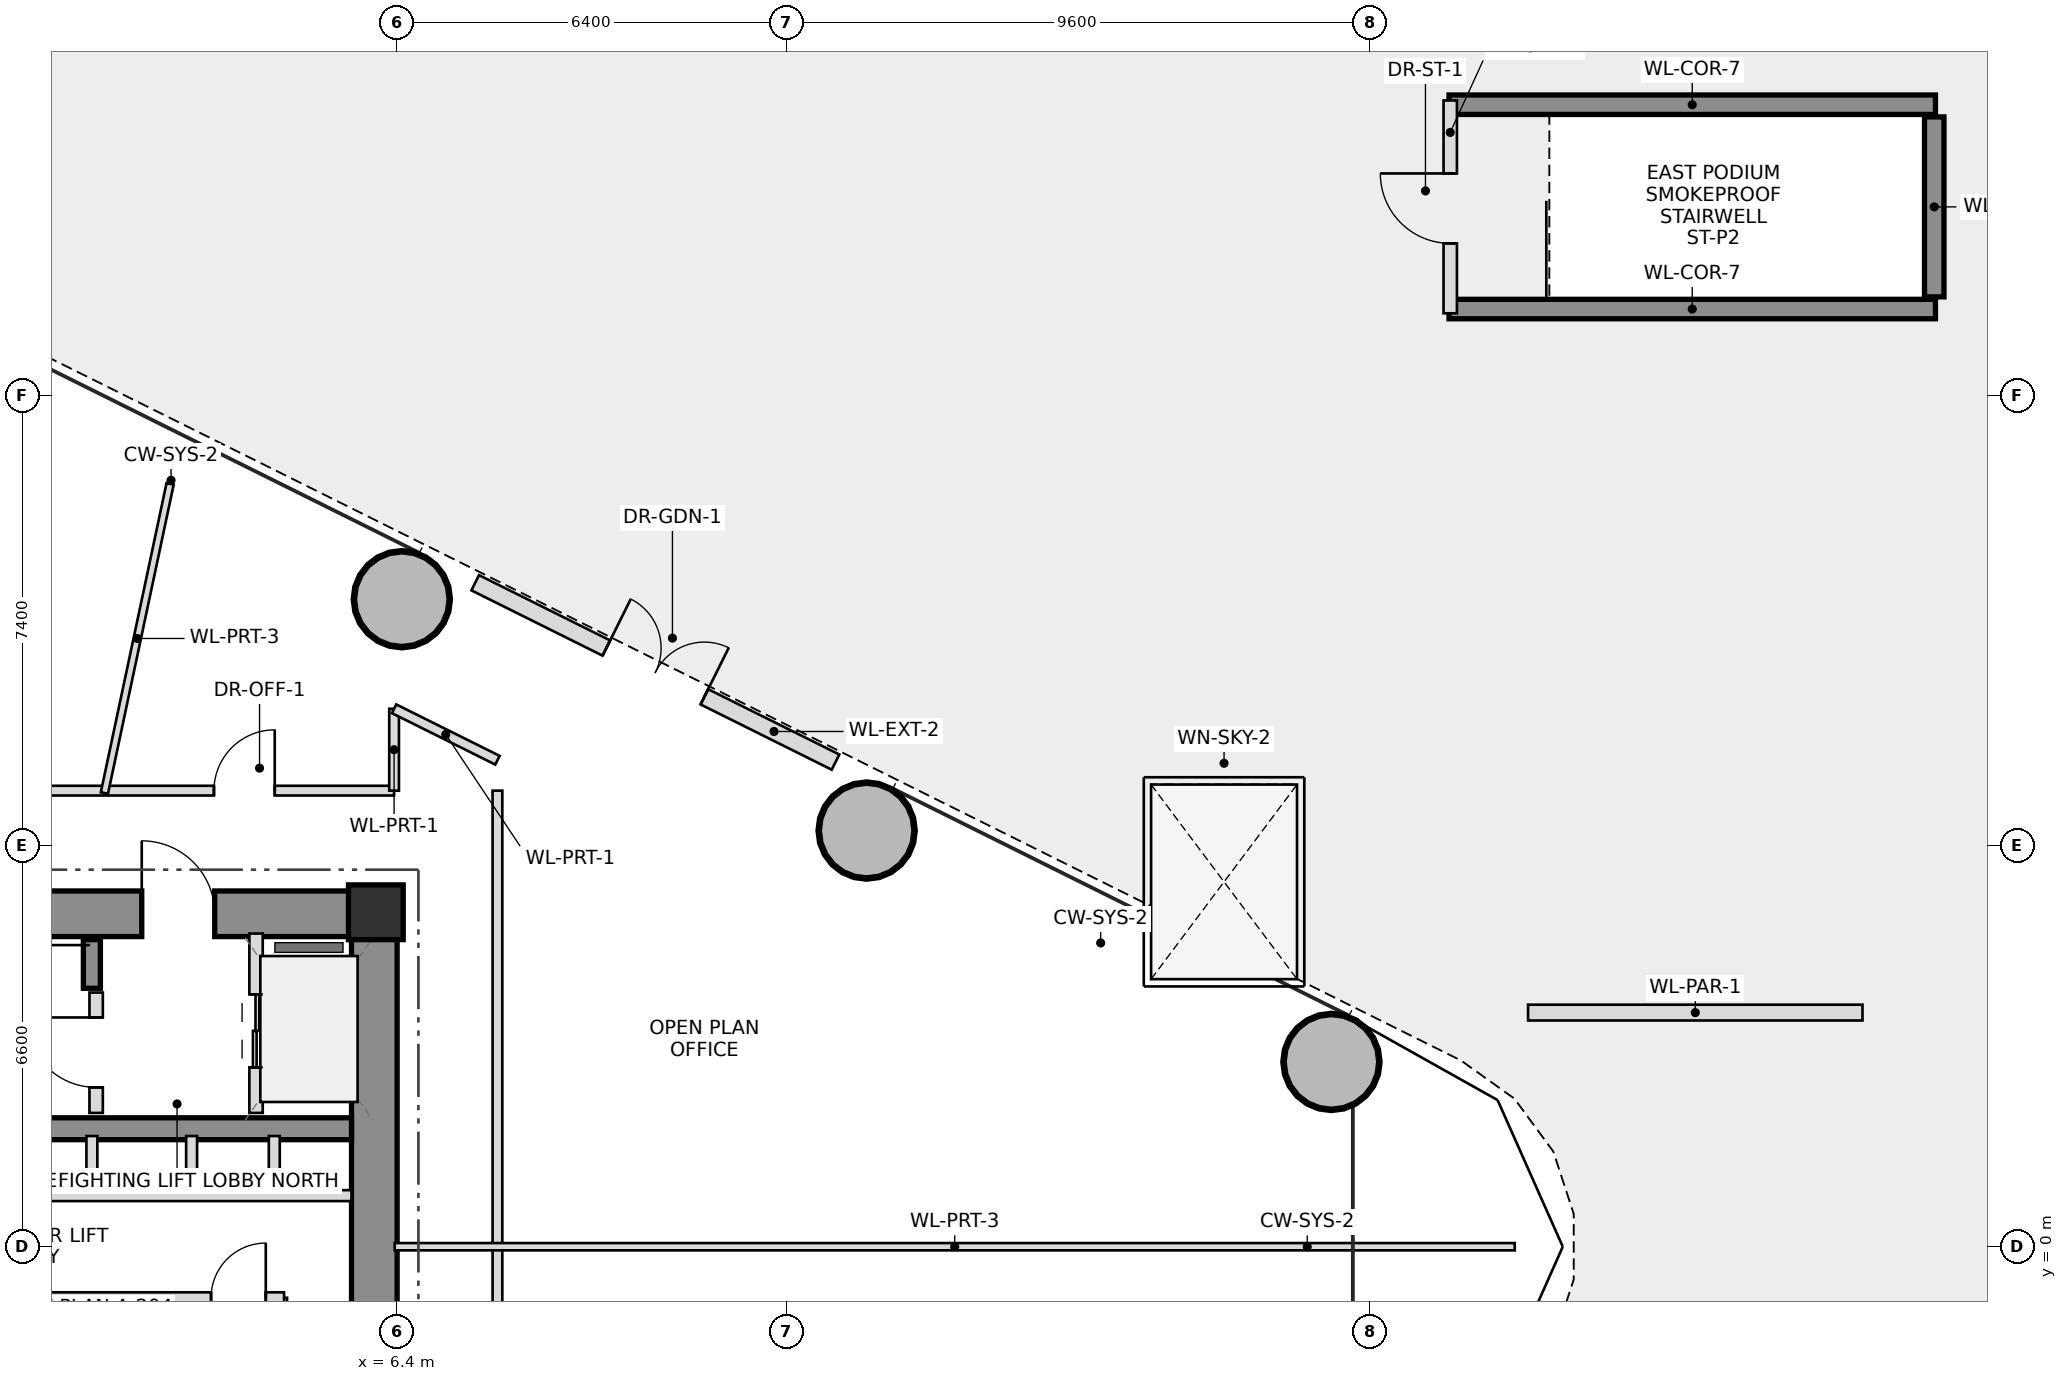
"""IFC4 building model, lengths in metres.
Left out: names, types, materials, properties, quantities, classifications, styles, units other than length and angle.
Written with IfcOpenShell. Run it as: python <this file> out.ifc"""

import sys

from ifc_helpers import new_model, si_unit, direction, frame, frame_2d, origin, origin_2d, place, context, subcontext, project, spatial, rectangle, hollow_circle, extrude, source, transform, mapped, element, fill, save


model = new_model("IFC4")
c1 = context("Model", 3, precision=1e-05, world=origin(), true_north=direction((0.0, 1.0)))
c2 = subcontext(c1, "Body", "Model", "MODEL_VIEW")
j1 = project(units=[si_unit("LENGTHUNIT", "METRE"), si_unit("PLANEANGLEUNIT", "RADIAN")], contexts=[c1])
p1 = place(None, origin())
s1 = spatial("IfcSite", under=j1, at=p1, CompositionType="ELEMENT")
p2 = place(p1, origin())
s2 = spatial("IfcBuilding", under=s1, at=p2, CompositionType="ELEMENT")
p3 = place(p2, frame((0.0, 0.0, 20.1)))
s3 = spatial("IfcBuildingStorey", under=s2, at=p3, CompositionType="ELEMENT", Elevation=20.1)
m1 = source(origin(), c2, "Body", "SweptSolid", [
    extrude(rectangle(XDim=0.9, YDim=0.9, at=origin_2d()), origin(), (0.0, 0.0, 1.0), 3.7),
])
p4 = place(p3, frame((6.05, 5.5, 0.0), z_axis=(0.0, 0.0, 1.0), x_axis=(1.0, 0.0, 0.0)))
e1 = element("IfcColumn", 1, at=p4, inside=s3, PredefinedType="COLUMN", context=c2, shape_type="MappedRepresentation", body=[
    mapped(m1, transform((0.0, 0.0, 0.0), scale=1.0)),
])
p5 = place(p3, frame((-6.4, 5.475, 0.0), z_axis=(0.0, 0.0, 1.0), x_axis=(1.0, 0.0, 0.0)))
e2 = element("IfcWall", 2, at=p5, inside=s3, PredefinedType="SHEAR", context=c2, shape_type="SweptSolid", body=[
    extrude(rectangle(XDim=12.8, YDim=0.75, at=frame_2d((6.4, 0.0))), origin(), (0.0, 0.0, 1.0), 3.7),
])
p6 = place(p5, frame((8.6, 0.0, 0.0)))
e3 = element("IfcOpeningElement", 3, at=p6, cuts=e2, PredefinedType="OPENING", context=c2, shape_type="SweptSolid", body=[
    extrude(rectangle(XDim=1.2, YDim=2.2, at=frame_2d((0.6, 1.1))), frame((0.0, 0.385, 0.0), z_axis=(0.0, -1.0, 0.0), x_axis=(1.0, 0.0, 0.0)), (0.0, 0.0, 1.0), 0.77),
])
p7 = place(p3, frame((6.025, -5.1, 0.0), z_axis=(0.0, 0.0, 1.0), x_axis=(0.0, 1.0, 0.0)))
e4 = element("IfcWall", 4, at=p7, inside=s3, PredefinedType="SHEAR", context=c2, shape_type="SweptSolid", body=[
    extrude(rectangle(XDim=10.2, YDim=0.75, at=frame_2d((5.1, 0.0))), origin(), (0.0, 0.0, 1.0), 3.7),
])
p8 = place(p3, frame((-5.65, 1.94, 0.0), z_axis=(0.0, 0.0, 1.0), x_axis=(1.0, 0.0, 0.0)))
e5 = element("IfcWall", 5, at=p8, inside=s3, PredefinedType="SHEAR", context=c2, shape_type="SweptSolid", body=[
    extrude(rectangle(XDim=11.3, YDim=0.36, at=frame_2d((5.65, 0.0))), origin(), (0.0, 0.0, 1.0), 3.7),
])
p9 = place(p3, frame((1.38, 4.25, 0.0), z_axis=(0.0, 0.0, 1.0), x_axis=(0.0, 1.0, 0.0)))
e6 = element("IfcWall", 6, at=p9, inside=s3, PredefinedType="SHEAR", context=c2, shape_type="SweptSolid", body=[
    extrude(rectangle(XDim=0.8, YDim=0.28, at=frame_2d((0.4, 0.0))), origin(), (0.0, 0.0, 1.0), 3.7),
])
for number, where, z_axis, x_axis in (
    (7, (23.7, 18.78, 0.0), (0.0, 0.0, 1.0), (1.0, 0.0, 0.0)),
    (8, (23.7, 15.42, 0.0), (0.0, 0.0, 1.0), (1.0, 0.0, 0.0)),
):
    element("IfcWall", number, at=place(p3, frame(where, z_axis=z_axis, x_axis=x_axis)), inside=s3, PredefinedType="SHEAR", context=c2, shape_type="SweptSolid", body=[
        extrude(rectangle(XDim=8.0, YDim=0.32, at=frame_2d((4.0, 0.0))), origin(), (0.0, 0.0, 1.0), 3.52),
    ])
p10 = place(p3, frame((31.68, 15.62, 0.0), z_axis=(0.0, 0.0, 1.0), x_axis=(0.0, 1.0, 0.0)))
e9 = element("IfcWall", 9, at=p10, inside=s3, PredefinedType="SHEAR", context=c2, shape_type="SweptSolid", body=[
    extrude(rectangle(XDim=2.96, YDim=0.32, at=frame_2d((1.48, 0.0))), origin(), (0.0, 0.0, 1.0), 3.52),
])
m2 = source(origin(), c2, "Body", "SweptSolid", [
    extrude(hollow_circle(Radius=0.8, WallThickness=0.055, at=origin_2d()), origin(), (0.0, 0.0, 1.0), 4.02),
])
for number, where, z_axis, x_axis in (
    (10, (21.766, 3.039, -0.32), (0.0, 0.0, 1.0), (1.0, 0.0, 0.0)),
    (11, (14.122, 6.844, -0.32), (0.0, 0.0, 1.0), (1.0, 0.0, 0.0)),
    (12, (6.477, 10.648, -0.32), (0.0, 0.0, 1.0), (1.0, 0.0, 0.0)),
):
    element("IfcColumn", number, at=place(p3, frame(where, z_axis=z_axis, x_axis=x_axis)), inside=s3, PredefinedType="COLUMN", context=c2, shape_type="MappedRepresentation", body=[
        mapped(m2, transform((0.0, 0.0, 0.0), scale=1.0)),
    ])
p11 = place(p3, frame((25.0, 3.85, 0.0), z_axis=(0.0, 0.0, 1.0), x_axis=(1.0, 0.0, 0.0)))
e13 = element("IfcWall", 13, at=p11, inside=s3, PredefinedType="PARAPET", context=c2, shape_type="SweptSolid", body=[
    extrude(rectangle(XDim=5.5, YDim=0.26, at=frame_2d((2.75, 0.0))), origin(), (0.0, 0.0, 1.0), 0.6),
])
p12 = place(p3, frame((7.684, 10.919, 0.0), z_axis=(0.0, 0.0, 1.0), x_axis=(0.895244546631, -0.445575135895, 0.0)))
e14 = element("IfcWall", 14, at=p12, inside=s3, PredefinedType="SOLIDWALL", context=c2, shape_type="SweptSolid", body=[
    extrude(rectangle(XDim=6.619, YDim=0.28, at=frame_2d((3.31, 0.0))), origin(), (0.0, 0.0, 1.0), 2.915),
])
p13 = place(p12, frame((2.409, 0.0, 0.0)))
e15 = element("IfcOpeningElement", 15, at=p13, cuts=e14, PredefinedType="OPENING", context=c2, shape_type="SweptSolid", body=[
    extrude(rectangle(XDim=1.8, YDim=2.35, at=frame_2d((0.9, 1.175))), frame((0.0, 0.15, 0.0), z_axis=(0.0, -1.0, 0.0), x_axis=(1.0, 0.0, 0.0)), (0.0, 0.0, 1.0), 0.3),
])
p14 = place(p3, frame((1.45, 2.2, 0.0), z_axis=(0.0, 0.0, 1.0), x_axis=(0.0, 1.0, 0.0)))
e16 = element("IfcWall", 16, at=p14, inside=s3, PredefinedType="PLUMBINGWALL", context=c2, shape_type="SweptSolid", body=[
    extrude(rectangle(XDim=1.98, YDim=0.22, at=frame_2d((0.99, 0.0))), origin(), (0.0, 0.0, 1.0), 3.495),
])
p15 = place(p14, frame((0.42, 0.0, 0.0)))
e17 = element("IfcOpeningElement", 17, at=p15, cuts=e16, PredefinedType="OPENING", context=c2, shape_type="SweptSolid", body=[
    extrude(rectangle(XDim=1.15, YDim=2.15, at=frame_2d((0.575, 1.075))), frame((0.0, 0.12, 0.0), z_axis=(0.0, -1.0, 0.0), x_axis=(1.0, 0.0, 0.0)), (0.0, 0.0, 1.0), 0.24),
])
p16 = place(p3, frame((4.08, 2.2, 0.0), z_axis=(0.0, 0.0, 1.0), x_axis=(0.0, 1.0, 0.0)))
e18 = element("IfcWall", 18, at=p16, inside=s3, PredefinedType="PLUMBINGWALL", context=c2, shape_type="SweptSolid", body=[
    extrude(rectangle(XDim=2.95, YDim=0.22, at=frame_2d((1.475, 0.0))), origin(), (0.0, 0.0, 1.0), 3.495),
])
p17 = place(p16, frame((0.75, 0.0, 0.0)))
e19 = element("IfcOpeningElement", 19, at=p17, cuts=e18, PredefinedType="OPENING", context=c2, shape_type="SweptSolid", body=[
    extrude(rectangle(XDim=1.2, YDim=2.25, at=frame_2d((0.6, 1.125))), frame((0.0, 0.12, 0.0), z_axis=(0.0, -1.0, 0.0), x_axis=(1.0, 0.0, 0.0)), (0.0, 0.0, 1.0), 0.24),
])
for number, where, z_axis, x_axis in (
    (20, (1.38, 0.84, 0.0), (0.0, 0.0, 1.0), (0.0, 1.0, 0.0)),
    (21, (1.38, -1.82, 0.0), (0.0, 0.0, 1.0), (0.0, 1.0, 0.0)),
    (22, (3.02, 0.84, 0.0), (0.0, 0.0, 1.0), (0.0, 1.0, 0.0)),
    (23, (4.38, 0.84, 0.0), (0.0, 0.0, 1.0), (0.0, 1.0, 0.0)),
    (24, (3.02, -1.82, 0.0), (0.0, 0.0, 1.0), (0.0, 1.0, 0.0)),
):
    element("IfcWall", number, at=place(p3, frame(where, z_axis=z_axis, x_axis=x_axis)), inside=s3, PredefinedType="PLUMBINGWALL", context=c2, shape_type="SweptSolid", body=[
        extrude(rectangle(XDim=0.98, YDim=0.18, at=frame_2d((0.49, 0.0))), origin(), (0.0, 0.0, 1.0), 3.495),
    ])
p18 = place(p3, frame((4.54, -1.82, 0.0), z_axis=(0.0, 0.0, 1.0), x_axis=(0.0, 1.0, 0.0)))
e25 = element("IfcWall", 25, at=p18, inside=s3, PredefinedType="PARTITIONING", context=c2, shape_type="SweptSolid", body=[
    extrude(rectangle(XDim=0.98, YDim=0.1, at=frame_2d((0.49, 0.0))), origin(), (0.0, 0.0, 1.0), 3.495),
])
p19 = place(p3, frame((-5.68, 0.84, 0.0), z_axis=(0.0, 0.0, 1.0), x_axis=(1.0, 0.0, 0.0)))
e26 = element("IfcWall", 26, at=p19, inside=s3, PredefinedType="PLUMBINGWALL", context=c2, shape_type="SweptSolid", body=[
    extrude(rectangle(XDim=11.33, YDim=0.18, at=frame_2d((5.665, 0.0))), origin(), (0.0, 0.0, 1.0), 3.495),
])
p20 = place(p19, frame((0.43, 0.0, 0.0)))
e27 = element("IfcOpeningElement", 27, at=p20, cuts=e26, PredefinedType="OPENING", context=c2, shape_type="SweptSolid", body=[
    extrude(rectangle(XDim=1.1, YDim=2.2, at=frame_2d((0.55, 1.1))), frame((0.0, 0.1, 0.0), z_axis=(0.0, -1.0, 0.0), x_axis=(1.0, 0.0, 0.0)), (0.0, 0.0, 1.0), 0.2),
])
p21 = place(p19, frame((2.13, 0.0, 0.0)))
e28 = element("IfcOpeningElement", 28, at=p21, cuts=e26, PredefinedType="OPENING", context=c2, shape_type="SweptSolid", body=[
    extrude(rectangle(XDim=1.1, YDim=2.2, at=frame_2d((0.55, 1.1))), frame((0.0, 0.1, 0.0), z_axis=(0.0, -1.0, 0.0), x_axis=(1.0, 0.0, 0.0)), (0.0, 0.0, 1.0), 0.2),
])
p22 = place(p3, frame((-5.68, -0.84, 0.0), z_axis=(0.0, 0.0, 1.0), x_axis=(1.0, 0.0, 0.0)))
e29 = element("IfcWall", 29, at=p22, inside=s3, PredefinedType="PLUMBINGWALL", context=c2, shape_type="SweptSolid", body=[
    extrude(rectangle(XDim=10.22, YDim=0.18, at=frame_2d((5.11, 0.0))), origin(), (0.0, 0.0, 1.0), 3.495),
])
p23 = place(p22, frame((0.43, 0.0, 0.0)))
e30 = element("IfcOpeningElement", 30, at=p23, cuts=e29, PredefinedType="OPENING", context=c2, shape_type="SweptSolid", body=[
    extrude(rectangle(XDim=1.1, YDim=2.2, at=frame_2d((0.55, 1.1))), frame((0.0, 0.1, 0.0), z_axis=(0.0, -1.0, 0.0), x_axis=(1.0, 0.0, 0.0)), (0.0, 0.0, 1.0), 0.2),
])
p24 = place(p22, frame((2.13, 0.0, 0.0)))
e31 = element("IfcOpeningElement", 31, at=p24, cuts=e29, PredefinedType="OPENING", context=c2, shape_type="SweptSolid", body=[
    extrude(rectangle(XDim=1.1, YDim=2.2, at=frame_2d((0.55, 1.1))), frame((0.0, 0.1, 0.0), z_axis=(0.0, -1.0, 0.0), x_axis=(1.0, 0.0, 0.0)), (0.0, 0.0, 1.0), 0.2),
])
p25 = place(p22, frame((9.02, 0.0, 0.0)))
e32 = element("IfcOpeningElement", 32, at=p25, cuts=e29, PredefinedType="OPENING", context=c2, shape_type="SweptSolid", body=[
    extrude(rectangle(XDim=0.9, YDim=2.05, at=frame_2d((0.45, 1.025))), frame((0.0, 0.1, 0.0), z_axis=(0.0, -1.0, 0.0), x_axis=(1.0, 0.0, 0.0)), (0.0, 0.0, 1.0), 0.2),
])
p26 = place(p3, frame((-6.35, 7.5, 0.0), z_axis=(0.0, 0.0, 1.0), x_axis=(1.0, 0.0, 0.0)))
e33 = element("IfcWall", 33, at=p26, inside=s3, PredefinedType="PARTITIONING", context=c2, shape_type="SweptSolid", body=[
    extrude(rectangle(XDim=12.7, YDim=0.16, at=frame_2d((6.35, 0.0))), origin(), (0.0, 0.0, 1.0), 2.8),
])
p27 = place(p26, frame((9.737, 0.0, 0.0)))
e34 = element("IfcOpeningElement", 34, at=p27, cuts=e33, PredefinedType="OPENING", context=c2, shape_type="SweptSolid", body=[
    extrude(rectangle(XDim=1.0, YDim=2.25, at=frame_2d((0.5, 1.125))), frame((0.0, 0.09, 0.0), z_axis=(0.0, -1.0, 0.0), x_axis=(1.0, 0.0, 0.0)), (0.0, 0.0, 1.0), 0.18),
])
p28 = place(p3, frame((6.35, 7.5, 0.0), z_axis=(0.0, 0.0, 1.0), x_axis=(0.0, 1.0, 0.0)))
e35 = element("IfcWall", 35, at=p28, inside=s3, PredefinedType="PARTITIONING", context=c2, shape_type="SweptSolid", body=[
    extrude(rectangle(XDim=1.346, YDim=0.16, at=frame_2d((0.673, 0.0))), origin(), (0.0, 0.0, 1.0), 2.8),
])
p29 = place(p3, frame((6.35, 8.846, 0.0), z_axis=(0.0, 0.0, 1.0), x_axis=(0.895274181873, -0.445515588136, 0.0)))
e36 = element("IfcWall", 36, at=p29, inside=s3, PredefinedType="PARTITIONING", context=c2, shape_type="SweptSolid", body=[
    extrude(rectangle(XDim=1.899, YDim=0.16, at=frame_2d((0.949, 0.0))), origin(), (0.0, 0.0, 1.0), 2.8),
])
for number, where, z_axis, x_axis in (
    (37, (8.05, 7.5, 0.0), (0.0, 0.0, 1.0), (0.0, -1.0, 0.0)),
    (38, (8.05, -0.02, 0.0), (0.0, 0.0, 1.0), (0.0, -1.0, 0.0)),
):
    element("IfcWall", number, at=place(p3, frame(where, z_axis=z_axis, x_axis=x_axis)), inside=s3, PredefinedType="PARTITIONING", context=c2, shape_type="SweptSolid", body=[
        extrude(rectangle(XDim=7.48, YDim=0.16, at=frame_2d((3.74, 0.0))), origin(), (0.0, 0.0, 1.0), 2.8),
    ])
p30 = place(p3, frame((6.36, 0.0, 0.0), z_axis=(0.0, 0.0, 1.0), x_axis=(1.0, 0.0, 0.0)))
e39 = element("IfcWall", 39, at=p30, inside=s3, PredefinedType="PARTITIONING", context=c2, shape_type="SweptSolid", body=[
    extrude(rectangle(XDim=18.421, YDim=0.12, at=frame_2d((9.21, 0.0))), origin(), (0.0, 0.0, 1.0), 2.96),
])
p31 = place(p3, frame((1.586, 7.46, 0.0), z_axis=(0.0, 0.0, 1.0), x_axis=(0.207905936394, 0.978148823857, 0.0)))
e40 = element("IfcWall", 40, at=p31, inside=s3, PredefinedType="PARTITIONING", context=c2, shape_type="SweptSolid", body=[
    extrude(rectangle(XDim=5.198, YDim=0.12, at=frame_2d((2.599, 0.0))), origin(), (0.0, 0.0, 1.0), 2.96),
])
p32 = place(p3, frame((23.72, 15.35, 0.0), z_axis=(0.0, 0.0, 1.0), x_axis=(0.0, 1.0, 0.0)))
e41 = element("IfcWall", 41, at=p32, inside=s3, PredefinedType="PLUMBINGWALL", context=c2, shape_type="SweptSolid", body=[
    extrude(rectangle(XDim=3.5, YDim=0.22, at=frame_2d((1.75, 0.0))), origin(), (0.0, 0.0, 1.0), 3.495),
])
p33 = place(p32, frame((1.15, 0.0, 0.0)))
e42 = element("IfcOpeningElement", 42, at=p33, cuts=e41, PredefinedType="OPENING", context=c2, shape_type="SweptSolid", body=[
    extrude(rectangle(XDim=1.15, YDim=2.15, at=frame_2d((0.575, 1.075))), frame((0.0, 0.12, 0.0), z_axis=(0.0, -1.0, 0.0), x_axis=(1.0, 0.0, 0.0)), (0.0, 0.0, 1.0), 0.24),
])
p34 = place(p3, frame((0.0, 0.0, -0.32)))
p35 = place(p34, frame((20.0, 6.0, 0.0)))
p36 = place(p35, frame((0.0, 0.0, 0.27)))
e43 = element("IfcWindow", 43, at=p36, inside=s3, PartitioningType="SINGLE_PANEL", PredefinedType="SKYLIGHT", context=c2, shape_type="SweptSolid", body=[
    extrude(rectangle(XDim=2.4, YDim=3.2, at=origin_2d()), origin(), (0.0, 0.0, 1.0), 0.05),
])
p37 = place(p13, origin())
e44 = element("IfcDoor", 44, at=p37, inside=s3, OperationType="DOUBLE_DOOR_SINGLE_SWING", PredefinedType="DOOR", context=c2, shape_type="SweptSolid", body=[
    extrude(rectangle(XDim=1.8, YDim=2.35, at=frame_2d((0.9, 1.175))), frame((0.0, 0.025, 0.0), z_axis=(0.0, -1.0, 0.0), x_axis=(1.0, 0.0, 0.0)), (0.0, 0.0, 1.0), 0.05),
])
fill(e15, e44)
p38 = place(p6, origin())
e45 = element("IfcDoor", 45, at=p38, inside=s3, OperationType="SINGLE_SWING_LEFT", PredefinedType="DOOR", context=c2, shape_type="SweptSolid", body=[
    extrude(rectangle(XDim=1.2, YDim=2.2, at=frame_2d((0.6, 1.1))), frame((0.0, 0.025, 0.0), z_axis=(0.0, -1.0, 0.0), x_axis=(1.0, 0.0, 0.0)), (0.0, 0.0, 1.0), 0.05),
])
fill(e3, e45)
p39 = place(p15, origin())
e46 = element("IfcDoor", 46, at=p39, inside=s3, OperationType="SINGLE_SWING_RIGHT", PredefinedType="DOOR", context=c2, shape_type="SweptSolid", body=[
    extrude(rectangle(XDim=1.15, YDim=2.15, at=frame_2d((0.575, 1.075))), frame((0.0, 0.025, 0.0), z_axis=(0.0, -1.0, 0.0), x_axis=(1.0, 0.0, 0.0)), (0.0, 0.0, 1.0), 0.05),
])
fill(e17, e46)
p40 = place(p17, origin())
e47 = element("IfcDoor", 47, at=p40, inside=s3, OperationType="DOUBLE_DOOR_SLIDING", PredefinedType="DOOR", context=c2, shape_type="SweptSolid", body=[
    extrude(rectangle(XDim=1.2, YDim=2.25, at=frame_2d((0.6, 1.125))), frame((0.0, 0.025, 0.0), z_axis=(0.0, -1.0, 0.0), x_axis=(1.0, 0.0, 0.0)), (0.0, 0.0, 1.0), 0.05),
])
fill(e19, e47)
p41 = place(p25, origin())
e48 = element("IfcDoor", 48, at=p41, inside=s3, OperationType="SINGLE_SWING_RIGHT", PredefinedType="DOOR", context=c2, shape_type="SweptSolid", body=[
    extrude(rectangle(XDim=0.9, YDim=2.05, at=frame_2d((0.45, 1.025))), frame((0.0, 0.025, 0.0), z_axis=(0.0, -1.0, 0.0), x_axis=(1.0, 0.0, 0.0)), (0.0, 0.0, 1.0), 0.05),
])
fill(e32, e48)
p42 = place(p27, origin())
e49 = element("IfcDoor", 49, at=p42, inside=s3, OperationType="SINGLE_SWING_RIGHT", PredefinedType="DOOR", context=c2, shape_type="SweptSolid", body=[
    extrude(rectangle(XDim=1.0, YDim=2.25, at=frame_2d((0.5, 1.125))), frame((0.0, 0.025, 0.0), z_axis=(0.0, -1.0, 0.0), x_axis=(1.0, 0.0, 0.0)), (0.0, 0.0, 1.0), 0.05),
])
fill(e34, e49)
p43 = place(p33, origin())
e50 = element("IfcDoor", 50, at=p43, inside=s3, OperationType="SINGLE_SWING_RIGHT", PredefinedType="DOOR", context=c2, shape_type="SweptSolid", body=[
    extrude(rectangle(XDim=1.15, YDim=2.15, at=frame_2d((0.575, 1.075))), frame((0.0, 0.025, 0.0), z_axis=(0.0, -1.0, 0.0), x_axis=(1.0, 0.0, 0.0)), (0.0, 0.0, 1.0), 0.05),
])
fill(e42, e50)
save(model, sys.argv[1])
